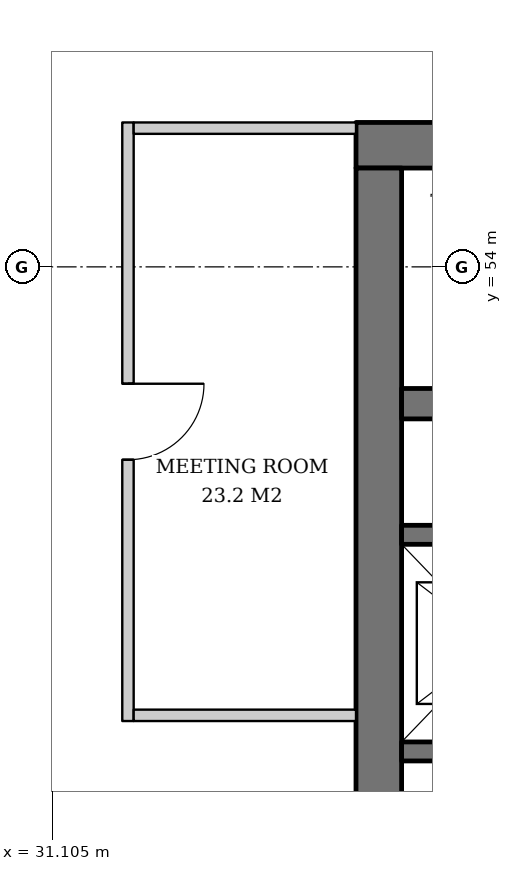
"""IFC4 building model, lengths in metres.
Left out: names, types, materials, properties, quantities, classifications, styles, units other than length and angle.
Written with IfcOpenShell. Run it as: python <this file> out.ifc"""

import sys

from ifc_helpers import new_model, si_unit, direction, frame, frame_2d, origin, place, context, subcontext, project, spatial, rectangle, extrude, element, fill, save


model = new_model("IFC4")
c1 = context("Model", 3, precision=1e-05, world=origin(), true_north=direction((0.0, 1.0)))
c2 = subcontext(c1, "Body", "Model", "MODEL_VIEW")
j1 = project(units=[si_unit("LENGTHUNIT", "METRE"), si_unit("PLANEANGLEUNIT", "RADIAN")], contexts=[c1])
p1 = place(None, origin())
s1 = spatial("IfcSite", under=j1, at=p1, CompositionType="ELEMENT")
p2 = place(p1, origin())
s2 = spatial("IfcBuilding", under=s1, at=p2, CompositionType="ELEMENT")
p3 = place(p2, frame((0.0, 0.0, 207.2)))
s3 = spatial("IfcBuildingStorey", under=s2, at=p3, CompositionType="ELEMENT", Elevation=207.2)
p4 = place(p3, frame((35.1, 55.6, 0.0), z_axis=(0.0, 0.0, 1.0), x_axis=(1.0, 0.0, 0.0)))
e1 = element("IfcWall", 1, at=p4, inside=s3, PredefinedType="SHEAR", context=c2, shape_type="SweptSolid", body=[
    extrude(rectangle(XDim=19.8, YDim=0.6, at=frame_2d((9.9, 0.0))), origin(), (0.0, 0.0, 1.0), 3.8),
])
p5 = place(p4, frame((14.54, 0.0, 0.0)))
e2 = element("IfcOpeningElement", 2, at=p5, cuts=e1, PredefinedType="OPENING", context=c2, shape_type="SweptSolid", body=[
    extrude(rectangle(XDim=1.0, YDim=2.1, at=frame_2d((0.5, 1.05))), frame((0.0, 0.31, 0.0), z_axis=(0.0, -1.0, 0.0), x_axis=(1.0, 0.0, 0.0)), (0.0, 0.0, 1.0), 0.62),
])
p6 = place(p4, frame((1.675, 0.0, 0.0)))
e3 = element("IfcOpeningElement", 3, at=p6, cuts=e1, PredefinedType="OPENING", context=c2, shape_type="SweptSolid", body=[
    extrude(rectangle(XDim=1.0, YDim=2.1, at=frame_2d((0.5, 1.05))), frame((0.0, 0.31, 0.0), z_axis=(0.0, -1.0, 0.0), x_axis=(1.0, 0.0, 0.0)), (0.0, 0.0, 1.0), 0.62),
])
p7 = place(p4, frame((3.587, 0.0, 0.0)))
e4 = element("IfcOpeningElement", 4, at=p7, cuts=e1, PredefinedType="OPENING", context=c2, shape_type="SweptSolid", body=[
    extrude(rectangle(XDim=1.0, YDim=2.1, at=frame_2d((0.5, 1.05))), frame((0.0, 0.31, 0.0), z_axis=(0.0, -1.0, 0.0), x_axis=(1.0, 0.0, 0.0)), (0.0, 0.0, 1.0), 0.62),
])
p8 = place(p3, frame((35.4, 36.7, 0.0), z_axis=(0.0, 0.0, 1.0), x_axis=(0.0, 1.0, 0.0)))
e5 = element("IfcWall", 5, at=p8, inside=s3, PredefinedType="SHEAR", context=c2, shape_type="SweptSolid", body=[
    extrude(rectangle(XDim=18.6, YDim=0.6, at=frame_2d((9.3, 0.0))), origin(), (0.0, 0.0, 1.0), 3.8),
])
p9 = place(p8, frame((8.4, 0.0, 0.0)))
e6 = element("IfcOpeningElement", 6, at=p9, cuts=e5, PredefinedType="OPENING", context=c2, shape_type="SweptSolid", body=[
    extrude(rectangle(XDim=1.8, YDim=2.4, at=frame_2d((0.9, 1.2))), frame((0.0, 0.31, 0.0), z_axis=(0.0, -1.0, 0.0), x_axis=(1.0, 0.0, 0.0)), (0.0, 0.0, 1.0), 0.62),
])
p10 = place(p3, frame((35.7, 52.2, 0.0), z_axis=(0.0, 0.0, 1.0), x_axis=(1.0, 0.0, 0.0)))
e7 = element("IfcWall", 7, at=p10, inside=s3, PredefinedType="SHEAR", context=c2, shape_type="SweptSolid", body=[
    extrude(rectangle(XDim=18.6, YDim=0.4, at=frame_2d((9.3, 0.0))), origin(), (0.0, 0.0, 1.0), 3.8),
])
p11 = place(p3, frame((35.7, 50.475, 0.0), z_axis=(0.0, 0.0, 1.0), x_axis=(1.0, 0.0, 0.0)))
e8 = element("IfcWall", 8, at=p11, inside=s3, PredefinedType="SHEAR", context=c2, shape_type="SweptSolid", body=[
    extrude(rectangle(XDim=11.0, YDim=0.25, at=frame_2d((5.5, 0.0))), origin(), (0.0, 0.0, 1.0), 3.8),
])
p12 = place(p3, frame((35.7, 47.625, 0.0), z_axis=(0.0, 0.0, 1.0), x_axis=(1.0, 0.0, 0.0)))
e9 = element("IfcWall", 9, at=p12, inside=s3, PredefinedType="SHEAR", context=c2, shape_type="SweptSolid", body=[
    extrude(rectangle(XDim=12.83, YDim=0.25, at=frame_2d((6.415, 0.0))), origin(), (0.0, 0.0, 1.0), 3.8),
])
p13 = place(p12, frame((0.7, 0.0, 0.0)))
e10 = element("IfcOpeningElement", 10, at=p13, cuts=e9, PredefinedType="OPENING", context=c2, shape_type="SweptSolid", body=[
    extrude(rectangle(XDim=1.1, YDim=2.2, at=frame_2d((0.55, 1.1))), frame((0.0, 0.135, 0.0), z_axis=(0.0, -1.0, 0.0), x_axis=(1.0, 0.0, 0.0)), (0.0, 0.0, 1.0), 0.27),
])
p14 = place(p12, frame((3.45, 0.0, 0.0)))
e11 = element("IfcOpeningElement", 11, at=p14, cuts=e9, PredefinedType="OPENING", context=c2, shape_type="SweptSolid", body=[
    extrude(rectangle(XDim=1.1, YDim=2.2, at=frame_2d((0.55, 1.1))), frame((0.0, 0.135, 0.0), z_axis=(0.0, -1.0, 0.0), x_axis=(1.0, 0.0, 0.0)), (0.0, 0.0, 1.0), 0.27),
])
p15 = place(p12, frame((6.2, 0.0, 0.0)))
e12 = element("IfcOpeningElement", 12, at=p15, cuts=e9, PredefinedType="OPENING", context=c2, shape_type="SweptSolid", body=[
    extrude(rectangle(XDim=1.1, YDim=2.2, at=frame_2d((0.55, 1.1))), frame((0.0, 0.135, 0.0), z_axis=(0.0, -1.0, 0.0), x_axis=(1.0, 0.0, 0.0)), (0.0, 0.0, 1.0), 0.27),
])
p16 = place(p12, frame((9.0, 0.0, 0.0)))
e13 = element("IfcOpeningElement", 13, at=p16, cuts=e9, PredefinedType="OPENING", context=c2, shape_type="SweptSolid", body=[
    extrude(rectangle(XDim=1.0, YDim=2.1, at=frame_2d((0.5, 1.05))), frame((0.0, 0.135, 0.0), z_axis=(0.0, -1.0, 0.0), x_axis=(1.0, 0.0, 0.0)), (0.0, 0.0, 1.0), 0.27),
])
p17 = place(p12, frame((11.515, 0.0, 0.0)))
e14 = element("IfcOpeningElement", 14, at=p17, cuts=e9, PredefinedType="OPENING", context=c2, shape_type="SweptSolid", body=[
    extrude(rectangle(XDim=0.8, YDim=2.0, at=frame_2d((0.4, 1.0))), frame((0.0, 0.135, 0.0), z_axis=(0.0, -1.0, 0.0), x_axis=(1.0, 0.0, 0.0)), (0.0, 0.0, 1.0), 0.27),
])
p18 = place(p3, frame((32.1, 55.9, 0.0), z_axis=(0.0, 0.0, 1.0), x_axis=(0.0, -1.0, 0.0)))
e15 = element("IfcWall", 15, at=p18, inside=s3, PredefinedType="PARTITIONING", context=c2, shape_type="SweptSolid", body=[
    extrude(rectangle(XDim=7.875, YDim=0.15, at=frame_2d((3.938, 0.0))), origin(), (0.0, 0.0, 1.0), 2.867),
])
p19 = place(p18, frame((3.438, 0.0, 0.0)))
e16 = element("IfcOpeningElement", 16, at=p19, cuts=e15, PredefinedType="OPENING", context=c2, shape_type="SweptSolid", body=[
    extrude(rectangle(XDim=1.0, YDim=2.1, at=frame_2d((0.5, 1.05))), frame((0.0, 0.085, 0.0), z_axis=(0.0, -1.0, 0.0), x_axis=(1.0, 0.0, 0.0)), (0.0, 0.0, 1.0), 0.17),
])
p20 = place(p3, frame((35.1, 55.825, 0.0), z_axis=(0.0, 0.0, 1.0), x_axis=(-1.0, 0.0, 0.0)))
e17 = element("IfcWall", 17, at=p20, inside=s3, PredefinedType="PARTITIONING", context=c2, shape_type="SweptSolid", body=[
    extrude(rectangle(XDim=2.925, YDim=0.15, at=frame_2d((1.462, 0.0))), origin(), (0.0, 0.0, 1.0), 2.867),
])
p21 = place(p3, frame((35.1, 48.1, 0.0), z_axis=(0.0, 0.0, 1.0), x_axis=(-1.0, 0.0, 0.0)))
e18 = element("IfcWall", 18, at=p21, inside=s3, PredefinedType="PARTITIONING", context=c2, shape_type="SweptSolid", body=[
    extrude(rectangle(XDim=2.925, YDim=0.15, at=frame_2d((1.462, 0.0))), origin(), (0.0, 0.0, 1.0), 3.62),
])
p22 = place(p19, origin())
e19 = element("IfcDoor", 19, at=p22, inside=s3, OperationType="SINGLE_SWING_LEFT", PredefinedType="DOOR", context=c2, shape_type="SweptSolid", body=[
    extrude(rectangle(XDim=1.0, YDim=2.1, at=frame_2d((0.5, 1.05))), frame((0.0, 0.025, 0.0), z_axis=(0.0, -1.0, 0.0), x_axis=(1.0, 0.0, 0.0)), (0.0, 0.0, 1.0), 0.05),
])
fill(e16, e19)
save(model, sys.argv[1])
